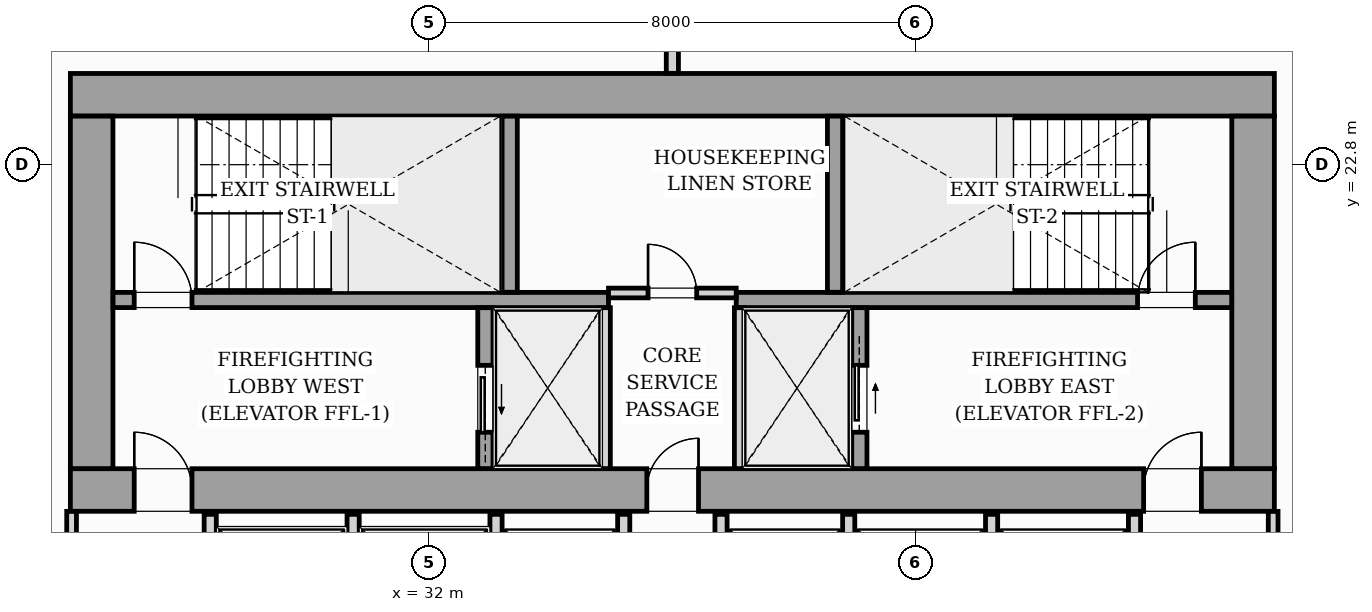
"""IFC4 building model, lengths in metres.
Left out: names, types, materials, properties, quantities, classifications, styles, units other than length and angle.
Written with IfcOpenShell. Run it as: python <this file> out.ifc"""

import sys

from ifc_helpers import new_model, si_unit, direction, frame, frame_2d, origin, origin_2d, place, context, subcontext, project, spatial, rectangle, i_section, extrude, source, transform, mapped, element, fill, save


model = new_model("IFC4")
c1 = context("Model", 3, precision=1e-05, world=origin(), true_north=direction((0.0, 1.0)))
c2 = subcontext(c1, "Body", "Model", "MODEL_VIEW")
j1 = project(units=[si_unit("LENGTHUNIT", "METRE"), si_unit("PLANEANGLEUNIT", "RADIAN")], contexts=[c1])
p1 = place(None, origin())
s1 = spatial("IfcSite", under=j1, at=p1, CompositionType="ELEMENT")
p2 = place(p1, origin())
s2 = spatial("IfcBuilding", under=s1, at=p2, CompositionType="ELEMENT")
p3 = place(p2, frame((0.0, 0.0, 81.0)))
s3 = spatial("IfcBuildingStorey", under=s2, at=p3, CompositionType="ELEMENT", Elevation=81.0)
m1 = source(origin(), c2, "Body", "SweptSolid", [
    extrude(i_section(OverallWidth=0.427, OverallDepth=0.483, WebThickness=0.051, FlangeThickness=0.082, FilletRadius=0.018, at=origin_2d()), origin(), (0.0, 0.0, 1.0), 3.196),
])
for number, where, z_axis, x_axis in (
    (1, (26.4, 17.4, 0.002), (0.0, 0.0, 1.0), (1.0, 0.0, 0.0)),
    (2, (33.12, 17.4, 0.002), (0.0, 0.0, 1.0), (1.0, 0.0, 0.0)),
    (3, (38.88, 17.4, 0.002), (0.0, 0.0, 1.0), (1.0, 0.0, 0.0)),
    (4, (45.6, 17.4, 0.002), (0.0, 0.0, 1.0), (1.0, 0.0, 0.0)),
    (5, (26.4, 24.0, 0.002), (0.0, 0.0, 1.0), (1.0, 0.0, 0.0)),
    (6, (33.12, 24.0, 0.002), (0.0, 0.0, 1.0), (1.0, 0.0, 0.0)),
    (7, (38.88, 24.0, 0.002), (0.0, 0.0, 1.0), (1.0, 0.0, 0.0)),
    (8, (45.6, 24.0, 0.002), (0.0, 0.0, 1.0), (1.0, 0.0, 0.0)),
):
    element("IfcColumn", number, at=place(p3, frame(where, z_axis=z_axis, x_axis=x_axis)), inside=s3, PredefinedType="PILASTER", context=c2, shape_type="MappedRepresentation", body=[
        mapped(m1, transform((0.0, 0.0, 0.0), scale=1.0)),
    ])
p4 = place(p3, frame((11.08, 23.508, 0.0), z_axis=(0.0, 0.0, 1.0), x_axis=(0.995396638587, 0.095841180552, 0.0)))
e9 = element("IfcWall", 9, at=p4, inside=s3, PredefinedType="STANDARD", context=c2, shape_type="SweptSolid", body=[
    extrude(rectangle(XDim=19.11, YDim=0.26, at=frame_2d((9.555, 0.0))), origin(), (0.0, 0.0, 1.0), 2.94),
])
p5 = place(p4, frame((7.159, 0.0, 0.0)))
e10 = element("IfcOpeningElement", 10, at=p5, cuts=e9, PredefinedType="OPENING", context=c2, shape_type="SweptSolid", body=[
    extrude(rectangle(XDim=1.8, YDim=2.06, at=frame_2d((0.9, 1.03))), frame((0.0, 0.14, 0.0), z_axis=(0.0, -1.0, 0.0), x_axis=(1.0, 0.0, 0.0)), (0.0, 0.0, 1.0), 0.28),
])
p6 = place(p4, frame((2.05, 0.0, 0.65)))
e11 = element("IfcOpeningElement", 11, at=p6, cuts=e9, PredefinedType="OPENING", context=c2, shape_type="SweptSolid", body=[
    extrude(rectangle(XDim=1.6, YDim=1.5, at=frame_2d((0.8, 0.75))), frame((0.0, 0.14, 0.0), z_axis=(0.0, -1.0, 0.0), x_axis=(1.0, 0.0, 0.0)), (0.0, 0.0, 1.0), 0.28),
])
p7 = place(p3, frame((26.1, 17.45, 0.0), z_axis=(0.0, 0.0, 1.0), x_axis=(1.0, 0.0, 0.0)))
e12 = element("IfcWall", 12, at=p7, inside=s3, PredefinedType="SHEAR", context=c2, shape_type="SweptSolid", body=[
    extrude(rectangle(XDim=19.8, YDim=0.7, at=frame_2d((9.9, 0.0))), origin(), (0.0, 0.0, 1.0), 3.2),
])
p8 = place(p7, frame((1.05, 0.0, 0.0)))
e13 = element("IfcOpeningElement", 13, at=p8, cuts=e12, PredefinedType="OPENING", context=c2, shape_type="SweptSolid", body=[
    extrude(rectangle(XDim=0.95, YDim=2.06, at=frame_2d((0.475, 1.03))), frame((0.0, 0.36, 0.0), z_axis=(0.0, -1.0, 0.0), x_axis=(1.0, 0.0, 0.0)), (0.0, 0.0, 1.0), 0.72),
])
p9 = place(p7, frame((9.48, 0.0, 0.0)))
e14 = element("IfcOpeningElement", 14, at=p9, cuts=e12, PredefinedType="OPENING", context=c2, shape_type="SweptSolid", body=[
    extrude(rectangle(XDim=0.85, YDim=2.0, at=frame_2d((0.425, 1.0))), frame((0.0, 0.36, 0.0), z_axis=(0.0, -1.0, 0.0), x_axis=(1.0, 0.0, 0.0)), (0.0, 0.0, 1.0), 0.72),
])
p10 = place(p7, frame((17.65, 0.0, 0.0)))
e15 = element("IfcOpeningElement", 15, at=p10, cuts=e12, PredefinedType="OPENING", context=c2, shape_type="SweptSolid", body=[
    extrude(rectangle(XDim=0.95, YDim=2.06, at=frame_2d((0.475, 1.03))), frame((0.0, 0.36, 0.0), z_axis=(0.0, -1.0, 0.0), x_axis=(1.0, 0.0, 0.0)), (0.0, 0.0, 1.0), 0.72),
])
p11 = place(p3, frame((26.1, 23.95, 0.0), z_axis=(0.0, 0.0, 1.0), x_axis=(1.0, 0.0, 0.0)))
e16 = element("IfcWall", 16, at=p11, inside=s3, PredefinedType="SHEAR", context=c2, shape_type="SweptSolid", body=[
    extrude(rectangle(XDim=19.8, YDim=0.7, at=frame_2d((9.9, 0.0))), origin(), (0.0, 0.0, 1.0), 3.2),
])
for number, where, z_axis, x_axis in (
    (17, (26.45, 17.802, 0.0), (0.0, 0.0, 1.0), (0.0, 1.0, 0.0)),
    (18, (45.55, 17.802, 0.0), (0.0, 0.0, 1.0), (0.0, 1.0, 0.0)),
):
    element("IfcWall", number, at=place(p3, frame(where, z_axis=z_axis, x_axis=x_axis)), inside=s3, PredefinedType="SHEAR", context=c2, shape_type="SweptSolid", body=[
        extrude(rectangle(XDim=5.796, YDim=0.7, at=frame_2d((2.898, 0.0))), origin(), (0.0, 0.0, 1.0), 3.2),
    ])
p12 = place(p3, frame((26.802, 20.575, 0.0), z_axis=(0.0, 0.0, 1.0), x_axis=(1.0, 0.0, 0.0)))
e19 = element("IfcWall", 19, at=p12, inside=s3, PredefinedType="SOLIDWALL", context=c2, shape_type="SweptSolid", body=[
    extrude(rectangle(XDim=8.148, YDim=0.25, at=frame_2d((4.074, 0.0))), origin(), (0.0, 0.0, 1.0), 3.2),
])
p13 = place(p12, frame((0.348, 0.0, 0.0)))
e20 = element("IfcOpeningElement", 20, at=p13, cuts=e19, PredefinedType="OPENING", context=c2, shape_type="SweptSolid", body=[
    extrude(rectangle(XDim=0.95, YDim=2.06, at=frame_2d((0.475, 1.03))), frame((0.0, 0.135, 0.0), z_axis=(0.0, -1.0, 0.0), x_axis=(1.0, 0.0, 0.0)), (0.0, 0.0, 1.0), 0.27),
])
p14 = place(p3, frame((37.05, 20.575, 0.0), z_axis=(0.0, 0.0, 1.0), x_axis=(1.0, 0.0, 0.0)))
e21 = element("IfcWall", 21, at=p14, inside=s3, PredefinedType="SOLIDWALL", context=c2, shape_type="SweptSolid", body=[
    extrude(rectangle(XDim=8.148, YDim=0.25, at=frame_2d((4.074, 0.0))), origin(), (0.0, 0.0, 1.0), 3.2),
])
p15 = place(p14, frame((6.6, 0.0, 0.0)))
e22 = element("IfcOpeningElement", 22, at=p15, cuts=e21, PredefinedType="OPENING", context=c2, shape_type="SweptSolid", body=[
    extrude(rectangle(XDim=0.95, YDim=2.06, at=frame_2d((0.475, 1.03))), frame((0.0, 0.135, 0.0), z_axis=(0.0, -1.0, 0.0), x_axis=(1.0, 0.0, 0.0)), (0.0, 0.0, 1.0), 0.27),
])
for number, where, z_axis, x_axis in (
    (23, (33.325, 20.702, 0.0), (0.0, 0.0, 1.0), (0.0, 1.0, 0.0)),
    (24, (38.675, 20.702, 0.0), (0.0, 0.0, 1.0), (0.0, 1.0, 0.0)),
):
    element("IfcWall", number, at=place(p3, frame(where, z_axis=z_axis, x_axis=x_axis)), inside=s3, PredefinedType="SOLIDWALL", context=c2, shape_type="SweptSolid", body=[
        extrude(rectangle(XDim=2.896, YDim=0.25, at=frame_2d((1.448, 0.0))), origin(), (0.0, 0.0, 1.0), 3.2),
    ])
p16 = place(p3, frame((32.925, 17.802, 0.0), z_axis=(0.0, 0.0, 1.0), x_axis=(0.0, 1.0, 0.0)))
e25 = element("IfcWall", 25, at=p16, inside=s3, PredefinedType="SOLIDWALL", context=c2, shape_type="SweptSolid", body=[
    extrude(rectangle(XDim=2.646, YDim=0.25, at=frame_2d((1.323, 0.0))), origin(), (0.0, 0.0, 1.0), 3.2),
])
p17 = place(p16, frame((0.598, 0.0, 0.0)))
e26 = element("IfcOpeningElement", 26, at=p17, cuts=e25, PredefinedType="OPENING", context=c2, shape_type="SweptSolid", body=[
    extrude(rectangle(XDim=1.1, YDim=2.08, at=frame_2d((0.55, 1.04))), frame((0.0, 0.135, 0.0), z_axis=(0.0, -1.0, 0.0), x_axis=(1.0, 0.0, 0.0)), (0.0, 0.0, 1.0), 0.27),
])
for number, where, z_axis, x_axis in (
    (27, (34.9, 17.802, 0.0), (0.0, 0.0, 1.0), (0.0, 1.0, 0.0)),
    (28, (37.1, 17.802, 0.0), (0.0, 0.0, 1.0), (0.0, 1.0, 0.0)),
):
    element("IfcWall", number, at=place(p3, frame(where, z_axis=z_axis, x_axis=x_axis)), inside=s3, PredefinedType="PARTITIONING", context=c2, shape_type="SweptSolid", body=[
        extrude(rectangle(XDim=2.646, YDim=0.16, at=frame_2d((1.323, 0.0))), origin(), (0.0, 0.0, 1.0), 2.94),
    ])
p18 = place(p3, frame((39.075, 17.802, 0.0), z_axis=(0.0, 0.0, 1.0), x_axis=(0.0, 1.0, 0.0)))
e29 = element("IfcWall", 29, at=p18, inside=s3, PredefinedType="SOLIDWALL", context=c2, shape_type="SweptSolid", body=[
    extrude(rectangle(XDim=2.646, YDim=0.25, at=frame_2d((1.323, 0.0))), origin(), (0.0, 0.0, 1.0), 3.2),
])
p19 = place(p18, frame((0.598, 0.0, 0.0)))
e30 = element("IfcOpeningElement", 30, at=p19, cuts=e29, PredefinedType="OPENING", context=c2, shape_type="SweptSolid", body=[
    extrude(rectangle(XDim=1.1, YDim=2.08, at=frame_2d((0.55, 1.04))), frame((0.0, 0.135, 0.0), z_axis=(0.0, -1.0, 0.0), x_axis=(1.0, 0.0, 0.0)), (0.0, 0.0, 1.0), 0.27),
])
p20 = place(p3, frame((34.95, 20.69, 0.0), z_axis=(0.0, 0.0, 1.0), x_axis=(1.0, 0.0, 0.0)))
e31 = element("IfcWall", 31, at=p20, inside=s3, PredefinedType="PARTITIONING", context=c2, shape_type="SweptSolid", body=[
    extrude(rectangle(XDim=2.1, YDim=0.16, at=frame_2d((1.05, 0.0))), origin(), (0.0, 0.0, 1.0), 2.94),
])
p21 = place(p20, frame((0.65, 0.0, 0.0)))
e32 = element("IfcOpeningElement", 32, at=p21, cuts=e31, PredefinedType="OPENING", context=c2, shape_type="SweptSolid", body=[
    extrude(rectangle(XDim=0.8, YDim=2.05, at=frame_2d((0.4, 1.025))), frame((0.0, 0.09, 0.0), z_axis=(0.0, -1.0, 0.0), x_axis=(1.0, 0.0, 0.0)), (0.0, 0.0, 1.0), 0.18),
])
for number, where, z_axis, x_axis in (
    (33, (28.4, 14.75, 0.0), (0.0, 0.0, 1.0), (0.0, 1.0, 0.0)),
    (34, (30.75, 14.75, 0.0), (0.0, 0.0, 1.0), (0.0, 1.0, 0.0)),
    (35, (33.1, 14.75, 0.0), (0.0, 0.0, 1.0), (0.0, 1.0, 0.0)),
    (36, (35.2, 14.75, 0.0), (0.0, 0.0, 1.0), (0.0, 1.0, 0.0)),
    (37, (36.8, 14.75, 0.0), (0.0, 0.0, 1.0), (0.0, 1.0, 0.0)),
    (38, (38.9, 14.75, 0.0), (0.0, 0.0, 1.0), (0.0, 1.0, 0.0)),
    (39, (41.25, 14.75, 0.0), (0.0, 0.0, 1.0), (0.0, 1.0, 0.0)),
    (40, (43.6, 14.75, 0.0), (0.0, 0.0, 1.0), (0.0, 1.0, 0.0)),
):
    element("IfcWall", number, at=place(p3, frame(where, z_axis=z_axis, x_axis=x_axis)), inside=s3, PredefinedType="PARTITIONING", context=c2, shape_type="SweptSolid", body=[
        extrude(rectangle(XDim=2.3, YDim=0.2, at=frame_2d((1.15, 0.0))), origin(), (0.0, 0.0, 1.0), 2.94),
    ])
p22 = place(p3, frame((36.0, 24.302, 0.0), z_axis=(0.0, 0.0, 1.0), x_axis=(0.0, 1.0, 0.0)))
e41 = element("IfcWall", 41, at=p22, inside=s3, PredefinedType="PARTITIONING", context=c2, shape_type="SweptSolid", body=[
    extrude(rectangle(XDim=1.656, YDim=0.2, at=frame_2d((0.828, 0.0))), origin(), (0.0, 0.0, 1.0), 2.94),
])
for number, where, z_axis, x_axis in (
    (42, (26.12, 14.762, 0.0), (0.0, 0.0, 1.0), (0.0, 1.0, 0.0)),
    (43, (45.88, 14.762, 0.0), (0.0, 0.0, 1.0), (0.0, 1.0, 0.0)),
):
    element("IfcWall", number, at=place(p3, frame(where, z_axis=z_axis, x_axis=x_axis)), inside=s3, PredefinedType="PARTITIONING", context=c2, shape_type="SweptSolid", body=[
        extrude(rectangle(XDim=2.336, YDim=0.16, at=frame_2d((1.168, 0.0))), origin(), (0.0, 0.0, 1.0), 2.94),
    ])
m2 = source(origin(), c2, "Body", "SweptSolid", [
    extrude(rectangle(XDim=0.95, YDim=2.06, at=frame_2d((0.475, 1.03))), frame((0.0, 0.025, 0.0), z_axis=(0.0, -1.0, 0.0), x_axis=(1.0, 0.0, 0.0)), (0.0, 0.0, 1.0), 0.05),
])
p23 = place(p8, origin())
e44 = element("IfcDoor", 44, at=p23, inside=s3, OperationType="SINGLE_SWING_LEFT", PredefinedType="DOOR", context=c2, shape_type="MappedRepresentation", body=[
    mapped(m2, transform((0.0, 0.0, 0.0), scale=1.0)),
])
fill(e13, e44)
m3 = source(origin(), c2, "Body", "SweptSolid", [
    extrude(rectangle(XDim=0.85, YDim=2.0, at=frame_2d((0.425, 1.0))), frame((0.0, 0.025, 0.0), z_axis=(0.0, -1.0, 0.0), x_axis=(1.0, 0.0, 0.0)), (0.0, 0.0, 1.0), 0.05),
])
p24 = place(p9, origin())
e45 = element("IfcDoor", 45, at=p24, inside=s3, OperationType="SINGLE_SWING_RIGHT", PredefinedType="DOOR", context=c2, shape_type="MappedRepresentation", body=[
    mapped(m3, transform((0.0, 0.0, 0.0), scale=1.0)),
])
fill(e14, e45)
p25 = place(p10, origin())
e46 = element("IfcDoor", 46, at=p25, inside=s3, OperationType="SINGLE_SWING_RIGHT", PredefinedType="DOOR", context=c2, shape_type="MappedRepresentation", body=[
    mapped(m2, transform((0.0, 0.0, 0.0), scale=1.0)),
])
fill(e15, e46)
p26 = place(p13, origin())
e47 = element("IfcDoor", 47, at=p26, inside=s3, OperationType="SINGLE_SWING_LEFT", PredefinedType="DOOR", context=c2, shape_type="MappedRepresentation", body=[
    mapped(m2, transform((0.0, 0.0, 0.0), scale=1.0)),
])
fill(e20, e47)
p27 = place(p15, origin())
e48 = element("IfcDoor", 48, at=p27, inside=s3, OperationType="SINGLE_SWING_RIGHT", PredefinedType="DOOR", context=c2, shape_type="MappedRepresentation", body=[
    mapped(m2, transform((0.0, 0.0, 0.0), scale=1.0)),
])
fill(e22, e48)
m4 = source(origin(), c2, "Body", "SweptSolid", [
    extrude(rectangle(XDim=1.1, YDim=2.08, at=frame_2d((0.55, 1.04))), frame((0.0, 0.025, 0.0), z_axis=(0.0, -1.0, 0.0), x_axis=(1.0, 0.0, 0.0)), (0.0, 0.0, 1.0), 0.05),
])
p28 = place(p17, origin())
e49 = element("IfcDoor", 49, at=p28, inside=s3, OperationType="SLIDING_TO_LEFT", PredefinedType="DOOR", context=c2, shape_type="MappedRepresentation", body=[
    mapped(m4, transform((0.0, 0.0, 0.0), scale=1.0)),
])
fill(e26, e49)
p29 = place(p19, origin())
e50 = element("IfcDoor", 50, at=p29, inside=s3, OperationType="SLIDING_TO_RIGHT", PredefinedType="DOOR", context=c2, shape_type="MappedRepresentation", body=[
    mapped(m4, transform((0.0, 0.0, 0.0), scale=1.0)),
])
fill(e30, e50)
m5 = source(origin(), c2, "Body", "SweptSolid", [
    extrude(rectangle(XDim=0.8, YDim=2.05, at=frame_2d((0.4, 1.025))), frame((0.0, 0.025, 0.0), z_axis=(0.0, -1.0, 0.0), x_axis=(1.0, 0.0, 0.0)), (0.0, 0.0, 1.0), 0.05),
])
p30 = place(p21, origin())
e51 = element("IfcDoor", 51, at=p30, inside=s3, OperationType="SINGLE_SWING_LEFT", PredefinedType="DOOR", context=c2, shape_type="MappedRepresentation", body=[
    mapped(m5, transform((0.0, 0.0, 0.0), scale=1.0)),
])
fill(e32, e51)
save(model, sys.argv[1])
